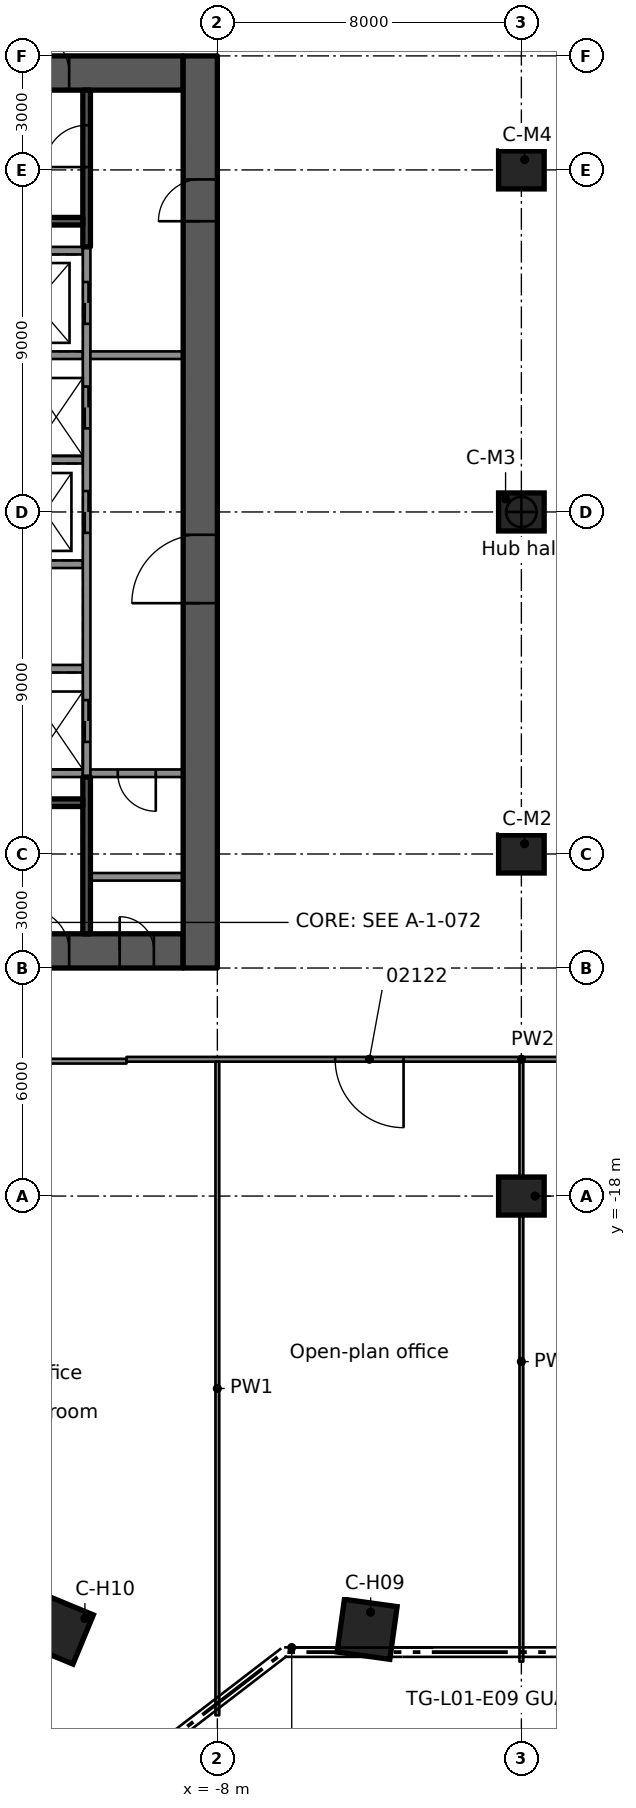
"""IFC4 building model, lengths in metres.
Left out: names, types, materials, properties, quantities, classifications, styles, units other than length and angle.
Written with IfcOpenShell. Run it as: python <this file> out.ifc"""

import sys

from ifc_helpers import new_model, si_unit, direction, frame, frame_2d, origin, origin_2d, place, context, subcontext, project, spatial, rectangle, extrude, element, fill, save


model = new_model("IFC4")
c1 = context("Model", 3, precision=1e-05, world=origin(), true_north=direction((0.0, 1.0)))
c2 = subcontext(c1, "Body", "Model", "MODEL_VIEW")
j1 = project(units=[si_unit("LENGTHUNIT", "METRE"), si_unit("PLANEANGLEUNIT", "RADIAN")], contexts=[c1])
p1 = place(None, origin())
s1 = spatial("IfcSite", under=j1, at=p1, CompositionType="ELEMENT")
p2 = place(p1, origin())
s2 = spatial("IfcBuilding", under=s1, at=p2, CompositionType="ELEMENT")
p3 = place(p2, frame((0.0, 0.0, 10.5)))
s3 = spatial("IfcBuildingStorey", under=s2, at=p3, CompositionType="ELEMENT", Elevation=10.5)
p4 = place(p3, frame((-18.1, 11.55, 0.0), z_axis=(0.0, 0.0, 1.0), x_axis=(1.0, 0.0, 0.0)))
e1 = element("IfcWall", 1, at=p4, inside=s3, PredefinedType="SHEAR", context=c2, shape_type="SweptSolid", body=[
    extrude(rectangle(XDim=9.2, YDim=0.9, at=frame_2d((4.6, 0.0))), origin(), (0.0, 0.0, 1.0), 5.0),
])
p5 = place(p4, frame((5.1, 0.0, 0.0)))
e2 = element("IfcOpeningElement", 2, at=p5, cuts=e1, PredefinedType="OPENING", context=c2, shape_type="SweptSolid", body=[
    extrude(rectangle(XDim=1.1, YDim=2.1, at=frame_2d((0.55, 1.05))), frame((0.0, 0.46, 0.0), z_axis=(0.0, -1.0, 0.0), x_axis=(1.0, 0.0, 0.0)), (0.0, 0.0, 1.0), 0.92),
])
p6 = place(p3, frame((-18.1, -11.55, 0.0), z_axis=(0.0, 0.0, 1.0), x_axis=(1.0, 0.0, 0.0)))
e3 = element("IfcWall", 3, at=p6, inside=s3, PredefinedType="SHEAR", context=c2, shape_type="SweptSolid", body=[
    extrude(rectangle(XDim=9.2, YDim=0.9, at=frame_2d((4.6, 0.0))), origin(), (0.0, 0.0, 1.0), 5.0),
])
p7 = place(p6, frame((5.1, 0.0, 0.0)))
e4 = element("IfcOpeningElement", 4, at=p7, cuts=e3, PredefinedType="OPENING", context=c2, shape_type="SweptSolid", body=[
    extrude(rectangle(XDim=1.1, YDim=2.1, at=frame_2d((0.55, 1.05))), frame((0.0, 0.46, 0.0), z_axis=(0.0, -1.0, 0.0), x_axis=(1.0, 0.0, 0.0)), (0.0, 0.0, 1.0), 0.92),
])
p8 = place(p6, frame((7.53, 0.0, 0.0)))
e5 = element("IfcOpeningElement", 5, at=p8, cuts=e3, PredefinedType="OPENING", context=c2, shape_type="SweptSolid", body=[
    extrude(rectangle(XDim=0.9, YDim=2.1, at=frame_2d((0.45, 1.05))), frame((0.0, 0.46, 0.0), z_axis=(0.0, -1.0, 0.0), x_axis=(1.0, 0.0, 0.0)), (0.0, 0.0, 1.0), 0.92),
])
p9 = place(p3, frame((-8.45, -12.0, 0.0), z_axis=(0.0, 0.0, 1.0), x_axis=(0.0, 1.0, 0.0)))
e6 = element("IfcWall", 6, at=p9, inside=s3, PredefinedType="SHEAR", context=c2, shape_type="SweptSolid", body=[
    extrude(rectangle(XDim=24.0, YDim=0.9, at=frame_2d((12.0, 0.0))), origin(), (0.0, 0.0, 1.0), 5.0),
])
p10 = place(p9, frame((9.6, 0.0, 0.0)))
e7 = element("IfcOpeningElement", 7, at=p10, cuts=e6, PredefinedType="OPENING", context=c2, shape_type="SweptSolid", body=[
    extrude(rectangle(XDim=1.8, YDim=2.1, at=frame_2d((0.9, 1.05))), frame((0.0, 0.46, 0.0), z_axis=(0.0, -1.0, 0.0), x_axis=(1.0, 0.0, 0.0)), (0.0, 0.0, 1.0), 0.92),
])
p11 = place(p9, frame((19.65, 0.0, 0.0)))
e8 = element("IfcOpeningElement", 8, at=p11, cuts=e6, PredefinedType="OPENING", context=c2, shape_type="SweptSolid", body=[
    extrude(rectangle(XDim=1.1, YDim=2.1, at=frame_2d((0.55, 1.05))), frame((0.0, 0.46, 0.0), z_axis=(0.0, -1.0, 0.0), x_axis=(1.0, 0.0, 0.0)), (0.0, 0.0, 1.0), 0.92),
])
for number, where, z_axis, x_axis in (
    (9, (-4.059, -29.4, -1.0), (0.0, 0.0, 1.0), (0.707, 0.707, 0.0)),
    (10, (-12.178, -29.4, -1.0), (0.0, 0.0, 1.0), (0.707, 0.707, 0.0)),
):
    element("IfcColumn", number, at=place(p3, frame(where, z_axis=z_axis, x_axis=x_axis)), inside=s3, PredefinedType="COLUMN", context=c2, shape_type="SweptSolid", body=[
        extrude(rectangle(XDim=3.4, YDim=3.4, at=origin_2d()), origin(), (0.0, 0.0, 1.0), 1.0),
    ])
for number, where, z_axis, x_axis in (
    (11, (-4.059, -29.4, 0.0), (0.0, 0.0, 1.0), (-0.137, -0.991, 0.0)),
    (12, (-12.178, -29.4, 0.0), (0.0, 0.0, 1.0), (-0.383, -0.924, 0.0)),
):
    element("IfcColumn", number, at=place(p3, frame(where, z_axis=z_axis, x_axis=x_axis)), inside=s3, PredefinedType="COLUMN", context=c2, shape_type="SweptSolid", body=[
        extrude(rectangle(XDim=1.4, YDim=1.4, at=origin_2d()), origin(), (0.0, 0.0, 1.0), 5.0),
    ])
for number, where, z_axis, x_axis in (
    (13, (0.0, -18.0, 0.0), (0.0, 0.0, 1.0), (1.0, 0.0, 0.0)),
    (14, (0.0, -9.0, 0.0), (0.0, 0.0, 1.0), (1.0, 0.0, 0.0)),
    (15, (0.0, 0.0, 0.0), (0.0, 0.0, 1.0), (1.0, 0.0, 0.0)),
    (16, (0.0, 9.0, 0.0), (0.0, 0.0, 1.0), (1.0, 0.0, 0.0)),
):
    element("IfcColumn", number, at=place(p3, frame(where, z_axis=z_axis, x_axis=x_axis)), inside=s3, PredefinedType="COLUMN", context=c2, shape_type="SweptSolid", body=[
        extrude(rectangle(XDim=1.2, YDim=1.0, at=origin_2d()), origin(), (0.0, 0.0, 1.0), 5.0),
    ])
for number, where, z_axis, x_axis in (
    (17, (-11.54, 6.875, 0.0), (0.0, 0.0, 1.0), (-1.0, 0.0, 0.0)),
    (18, (-11.54, -6.875, 0.0), (0.0, 0.0, 1.0), (-1.0, 0.0, 0.0)),
):
    element("IfcWall", number, at=place(p3, frame(where, z_axis=z_axis, x_axis=x_axis)), inside=s3, PredefinedType="SOLIDWALL", context=c2, shape_type="SweptSolid", body=[
        extrude(rectangle(XDim=6.56, YDim=0.2, at=frame_2d((3.28, 0.0))), origin(), (0.0, 0.0, 1.0), 4.59),
    ])
p12 = place(p3, frame((-11.54, -4.125, 0.0), z_axis=(0.0, 0.0, 1.0), x_axis=(-1.0, 0.0, 0.0)))
e19 = element("IfcWall", 19, at=p12, inside=s3, PredefinedType="SOLIDWALL", context=c2, shape_type="SweptSolid", body=[
    extrude(rectangle(XDim=4.7, YDim=0.2, at=frame_2d((2.35, 0.0))), origin(), (0.0, 0.0, 1.0), 4.59),
])
for number, where, z_axis, x_axis in (
    (20, (-11.54, -1.375, 0.0), (0.0, 0.0, 1.0), (-1.0, 0.0, 0.0)),
    (21, (-11.54, 1.375, 0.0), (0.0, 0.0, 1.0), (-1.0, 0.0, 0.0)),
):
    element("IfcWall", number, at=place(p3, frame(where, z_axis=z_axis, x_axis=x_axis)), inside=s3, PredefinedType="SOLIDWALL", context=c2, shape_type="SweptSolid", body=[
        extrude(rectangle(XDim=4.2, YDim=0.2, at=frame_2d((2.1, 0.0))), origin(), (0.0, 0.0, 1.0), 4.59),
    ])
p13 = place(p3, frame((-11.54, 4.125, 0.0), z_axis=(0.0, 0.0, 1.0), x_axis=(-1.0, 0.0, 0.0)))
e22 = element("IfcWall", 22, at=p13, inside=s3, PredefinedType="SOLIDWALL", context=c2, shape_type="SweptSolid", body=[
    extrude(rectangle(XDim=4.7, YDim=0.2, at=frame_2d((2.35, 0.0))), origin(), (0.0, 0.0, 1.0), 4.59),
])
p14 = place(p3, frame((-11.44, -6.975, 0.0), z_axis=(0.0, 0.0, 1.0), x_axis=(0.0, 1.0, 0.0)))
e23 = element("IfcWall", 23, at=p14, inside=s3, PredefinedType="SOLIDWALL", context=c2, shape_type="SweptSolid", body=[
    extrude(rectangle(XDim=13.95, YDim=0.2, at=frame_2d((6.975, 0.0))), origin(), (0.0, 0.0, 1.0), 4.59),
])
p15 = place(p14, frame((0.925, 0.0, 0.0)))
e24 = element("IfcOpeningElement", 24, at=p15, cuts=e23, PredefinedType="OPENING", context=c2, shape_type="SweptSolid", body=[
    extrude(rectangle(XDim=1.1, YDim=2.1, at=frame_2d((0.55, 1.05))), frame((0.0, 0.11, 0.0), z_axis=(0.0, -1.0, 0.0), x_axis=(1.0, 0.0, 0.0)), (0.0, 0.0, 1.0), 0.22),
])
p16 = place(p14, frame((6.425, 0.0, 0.0)))
e25 = element("IfcOpeningElement", 25, at=p16, cuts=e23, PredefinedType="OPENING", context=c2, shape_type="SweptSolid", body=[
    extrude(rectangle(XDim=1.1, YDim=2.1, at=frame_2d((0.55, 1.05))), frame((0.0, 0.11, 0.0), z_axis=(0.0, -1.0, 0.0), x_axis=(1.0, 0.0, 0.0)), (0.0, 0.0, 1.0), 0.22),
])
p17 = place(p14, frame((9.175, 0.0, 0.0)))
e26 = element("IfcOpeningElement", 26, at=p17, cuts=e23, PredefinedType="OPENING", context=c2, shape_type="SweptSolid", body=[
    extrude(rectangle(XDim=1.1, YDim=2.1, at=frame_2d((0.55, 1.05))), frame((0.0, 0.11, 0.0), z_axis=(0.0, -1.0, 0.0), x_axis=(1.0, 0.0, 0.0)), (0.0, 0.0, 1.0), 0.22),
])
p18 = place(p14, frame((11.925, 0.0, 0.0)))
e27 = element("IfcOpeningElement", 27, at=p18, cuts=e23, PredefinedType="OPENING", context=c2, shape_type="SweptSolid", body=[
    extrude(rectangle(XDim=1.1, YDim=2.1, at=frame_2d((0.55, 1.05))), frame((0.0, 0.11, 0.0), z_axis=(0.0, -1.0, 0.0), x_axis=(1.0, 0.0, 0.0)), (0.0, 0.0, 1.0), 0.22),
])
p19 = place(p3, frame((-11.44, 6.975, 0.0), z_axis=(0.0, 0.0, 1.0), x_axis=(0.0, 1.0, 0.0)))
e28 = element("IfcWall", 28, at=p19, inside=s3, PredefinedType="SOLIDWALL", context=c2, shape_type="SweptSolid", body=[
    extrude(rectangle(XDim=4.125, YDim=0.2, at=frame_2d((2.062, 0.0))), origin(), (0.0, 0.0, 1.0), 4.59),
])
p20 = place(p19, frame((2.1, 0.0, 0.0)))
e29 = element("IfcOpeningElement", 29, at=p20, cuts=e28, PredefinedType="OPENING", context=c2, shape_type="SweptSolid", body=[
    extrude(rectangle(XDim=1.1, YDim=2.1, at=frame_2d((0.55, 1.05))), frame((0.0, 0.11, 0.0), z_axis=(0.0, -1.0, 0.0), x_axis=(1.0, 0.0, 0.0)), (0.0, 0.0, 1.0), 0.22),
])
p21 = place(p3, frame((-11.54, 7.65, 0.0), z_axis=(0.0, 0.0, 1.0), x_axis=(-1.0, 0.0, 0.0)))
e30 = element("IfcWall", 30, at=p21, inside=s3, PredefinedType="SOLIDWALL", context=c2, shape_type="SweptSolid", body=[
    extrude(rectangle(XDim=6.56, YDim=0.2, at=frame_2d((3.28, 0.0))), origin(), (0.0, 0.0, 1.0), 4.59),
])
p22 = place(p3, frame((-11.44, -11.1, 0.0), z_axis=(0.0, 0.0, 1.0), x_axis=(0.0, 1.0, 0.0)))
e31 = element("IfcWall", 31, at=p22, inside=s3, PredefinedType="SOLIDWALL", context=c2, shape_type="SweptSolid", body=[
    extrude(rectangle(XDim=4.125, YDim=0.2, at=frame_2d((2.062, 0.0))), origin(), (0.0, 0.0, 1.0), 4.59),
])
p23 = place(p3, frame((-11.54, -7.65, 0.0), z_axis=(0.0, 0.0, 1.0), x_axis=(-1.0, 0.0, 0.0)))
e32 = element("IfcWall", 32, at=p23, inside=s3, PredefinedType="SOLIDWALL", context=c2, shape_type="SweptSolid", body=[
    extrude(rectangle(XDim=6.56, YDim=0.2, at=frame_2d((3.28, 0.0))), origin(), (0.0, 0.0, 1.0), 4.59),
])
p24 = place(p3, frame((-8.9, 4.125, 0.0), z_axis=(0.0, 0.0, 1.0), x_axis=(-1.0, 0.0, 0.0)))
e33 = element("IfcWall", 33, at=p24, inside=s3, PredefinedType="PARTITIONING", context=c2, shape_type="SweptSolid", body=[
    extrude(rectangle(XDim=2.44, YDim=0.2, at=frame_2d((1.22, 0.0))), origin(), (0.0, 0.0, 1.0), 4.59),
])
p25 = place(p3, frame((-8.9, -6.875, 0.0), z_axis=(0.0, 0.0, 1.0), x_axis=(-1.0, 0.0, 0.0)))
e34 = element("IfcWall", 34, at=p25, inside=s3, PredefinedType="PARTITIONING", context=c2, shape_type="SweptSolid", body=[
    extrude(rectangle(XDim=2.44, YDim=0.2, at=frame_2d((1.22, 0.0))), origin(), (0.0, 0.0, 1.0), 4.59),
])
p26 = place(p25, frame((0.72, 0.0, 0.0)))
e35 = element("IfcOpeningElement", 35, at=p26, cuts=e34, PredefinedType="OPENING", context=c2, shape_type="SweptSolid", body=[
    extrude(rectangle(XDim=1.0, YDim=2.1, at=frame_2d((0.5, 1.05))), frame((0.0, 0.11, 0.0), z_axis=(0.0, -1.0, 0.0), x_axis=(1.0, 0.0, 0.0)), (0.0, 0.0, 1.0), 0.22),
])
p27 = place(p3, frame((-8.9, -9.6, 0.0), z_axis=(0.0, 0.0, 1.0), x_axis=(-1.0, 0.0, 0.0)))
e36 = element("IfcWall", 36, at=p27, inside=s3, PredefinedType="PARTITIONING", context=c2, shape_type="SweptSolid", body=[
    extrude(rectangle(XDim=2.44, YDim=0.2, at=frame_2d((1.22, 0.0))), origin(), (0.0, 0.0, 1.0), 4.59),
])
p28 = place(p3, frame((-20.431, -23.791, 0.0), z_axis=(0.0, 0.0, 1.0), x_axis=(0.608708319694, -0.793394089678, 0.0)))
e37 = element("IfcWall", 37, at=p28, inside=s3, PredefinedType="PARTITIONING", context=c2, shape_type="SweptSolid", body=[
    extrude(rectangle(XDim=13.813, YDim=0.1, at=frame_2d((6.906, 0.0))), origin(), (0.0, 0.0, 1.0), 4.58),
])
p29 = place(p3, frame((-17.659, -14.451, 0.0), z_axis=(0.0, 0.0, 1.0), x_axis=(1.0, 0.0, 0.0)))
e38 = element("IfcWall", 38, at=p29, inside=s3, PredefinedType="PARTITIONING", context=c2, shape_type="SweptSolid", body=[
    extrude(rectangle(XDim=7.268, YDim=0.125, at=frame_2d((3.634, 0.0))), origin(), (0.0, 0.0, 1.0), 4.58),
])
p30 = place(p3, frame((10.391, -14.401, 0.0), z_axis=(0.0, 0.0, 1.0), x_axis=(-1.0, 0.0, 0.0)))
e39 = element("IfcWall", 39, at=p30, inside=s3, PredefinedType="PARTITIONING", context=c2, shape_type="SweptSolid", body=[
    extrude(rectangle(XDim=20.781, YDim=0.125, at=frame_2d((10.391, 0.0))), origin(), (0.0, 0.0, 1.0), 4.58),
])
p31 = place(p30, frame((13.491, 0.0, 0.0)))
e40 = element("IfcOpeningElement", 40, at=p31, cuts=e39, PredefinedType="OPENING", context=c2, shape_type="SweptSolid", body=[
    extrude(rectangle(XDim=1.8, YDim=2.1, at=frame_2d((0.9, 1.05))), frame((0.0, 0.073, 0.0), z_axis=(0.0, -1.0, 0.0), x_axis=(1.0, 0.0, 0.0)), (0.0, 0.0, 1.0), 0.145),
])
p32 = place(p30, frame((5.491, 0.0, 0.0)))
e41 = element("IfcOpeningElement", 41, at=p32, cuts=e39, PredefinedType="OPENING", context=c2, shape_type="SweptSolid", body=[
    extrude(rectangle(XDim=1.8, YDim=2.1, at=frame_2d((0.9, 1.05))), frame((0.0, 0.073, 0.0), z_axis=(0.0, -1.0, 0.0), x_axis=(1.0, 0.0, 0.0)), (0.0, 0.0, 1.0), 0.145),
])
p33 = place(p3, frame((0.0, -30.25, 0.0), z_axis=(0.0, 0.0, 1.0), x_axis=(0.0, 1.0, 0.0)))
e42 = element("IfcWall", 42, at=p33, inside=s3, PredefinedType="PARTITIONING", context=c2, shape_type="SweptSolid", body=[
    extrude(rectangle(XDim=15.787, YDim=0.1, at=frame_2d((7.894, 0.0))), origin(), (0.0, 0.0, 1.0), 4.58),
])
p34 = place(p3, frame((-8.0, -31.663, 0.0), z_axis=(0.0, 0.0, 1.0), x_axis=(0.0, 1.0, 0.0)))
e43 = element("IfcWall", 43, at=p34, inside=s3, PredefinedType="PARTITIONING", context=c2, shape_type="SweptSolid", body=[
    extrude(rectangle(XDim=17.2, YDim=0.1, at=frame_2d((8.6, 0.0))), origin(), (0.0, 0.0, 1.0), 4.58),
])
p35 = place(p15, origin())
e44 = element("IfcDoor", 44, at=p35, inside=s3, OperationType="DOUBLE_DOOR_SLIDING", PredefinedType="DOOR", context=c2, shape_type="SweptSolid", body=[
    extrude(rectangle(XDim=1.1, YDim=2.1, at=frame_2d((0.55, 1.05))), frame((0.0, 0.025, 0.0), z_axis=(0.0, -1.0, 0.0), x_axis=(1.0, 0.0, 0.0)), (0.0, 0.0, 1.0), 0.05),
])
fill(e24, e44)
p36 = place(p16, origin())
e45 = element("IfcDoor", 45, at=p36, inside=s3, OperationType="DOUBLE_DOOR_SLIDING", PredefinedType="DOOR", context=c2, shape_type="SweptSolid", body=[
    extrude(rectangle(XDim=1.1, YDim=2.1, at=frame_2d((0.55, 1.05))), frame((0.0, 0.025, 0.0), z_axis=(0.0, -1.0, 0.0), x_axis=(1.0, 0.0, 0.0)), (0.0, 0.0, 1.0), 0.05),
])
fill(e25, e45)
p37 = place(p17, origin())
e46 = element("IfcDoor", 46, at=p37, inside=s3, OperationType="DOUBLE_DOOR_SLIDING", PredefinedType="DOOR", context=c2, shape_type="SweptSolid", body=[
    extrude(rectangle(XDim=1.1, YDim=2.1, at=frame_2d((0.55, 1.05))), frame((0.0, 0.025, 0.0), z_axis=(0.0, -1.0, 0.0), x_axis=(1.0, 0.0, 0.0)), (0.0, 0.0, 1.0), 0.05),
])
fill(e26, e46)
p38 = place(p18, origin())
e47 = element("IfcDoor", 47, at=p38, inside=s3, OperationType="DOUBLE_DOOR_SLIDING", PredefinedType="DOOR", context=c2, shape_type="SweptSolid", body=[
    extrude(rectangle(XDim=1.1, YDim=2.1, at=frame_2d((0.55, 1.05))), frame((0.0, 0.025, 0.0), z_axis=(0.0, -1.0, 0.0), x_axis=(1.0, 0.0, 0.0)), (0.0, 0.0, 1.0), 0.05),
])
fill(e27, e47)
p39 = place(p10, origin())
e48 = element("IfcDoor", 48, at=p39, inside=s3, OperationType="SINGLE_SWING_LEFT", PredefinedType="DOOR", context=c2, shape_type="SweptSolid", body=[
    extrude(rectangle(XDim=1.8, YDim=2.1, at=frame_2d((0.9, 1.05))), frame((0.0, 0.025, 0.0), z_axis=(0.0, -1.0, 0.0), x_axis=(1.0, 0.0, 0.0)), (0.0, 0.0, 1.0), 0.05),
])
fill(e7, e48)
p40 = place(p11, origin())
e49 = element("IfcDoor", 49, at=p40, inside=s3, OperationType="SINGLE_SWING_RIGHT", PredefinedType="DOOR", context=c2, shape_type="SweptSolid", body=[
    extrude(rectangle(XDim=1.1, YDim=2.1, at=frame_2d((0.55, 1.05))), frame((0.0, 0.025, 0.0), z_axis=(0.0, -1.0, 0.0), x_axis=(1.0, 0.0, 0.0)), (0.0, 0.0, 1.0), 0.05),
])
fill(e8, e49)
p41 = place(p5, origin())
e50 = element("IfcDoor", 50, at=p41, inside=s3, OperationType="SINGLE_SWING_RIGHT", PredefinedType="DOOR", context=c2, shape_type="SweptSolid", body=[
    extrude(rectangle(XDim=1.1, YDim=2.1, at=frame_2d((0.55, 1.05))), frame((0.0, 0.025, 0.0), z_axis=(0.0, -1.0, 0.0), x_axis=(1.0, 0.0, 0.0)), (0.0, 0.0, 1.0), 0.05),
])
fill(e2, e50)
p42 = place(p7, origin())
e51 = element("IfcDoor", 51, at=p42, inside=s3, OperationType="SINGLE_SWING_RIGHT", PredefinedType="DOOR", context=c2, shape_type="SweptSolid", body=[
    extrude(rectangle(XDim=1.1, YDim=2.1, at=frame_2d((0.55, 1.05))), frame((0.0, 0.025, 0.0), z_axis=(0.0, -1.0, 0.0), x_axis=(1.0, 0.0, 0.0)), (0.0, 0.0, 1.0), 0.05),
])
fill(e4, e51)
p43 = place(p20, origin())
e52 = element("IfcDoor", 52, at=p43, inside=s3, OperationType="SINGLE_SWING_RIGHT", PredefinedType="DOOR", context=c2, shape_type="SweptSolid", body=[
    extrude(rectangle(XDim=1.1, YDim=2.1, at=frame_2d((0.55, 1.05))), frame((0.0, 0.025, 0.0), z_axis=(0.0, -1.0, 0.0), x_axis=(1.0, 0.0, 0.0)), (0.0, 0.0, 1.0), 0.05),
])
fill(e29, e52)
p44 = place(p8, origin())
e53 = element("IfcDoor", 53, at=p44, inside=s3, OperationType="SINGLE_SWING_RIGHT", PredefinedType="DOOR", context=c2, shape_type="SweptSolid", body=[
    extrude(rectangle(XDim=0.9, YDim=2.1, at=frame_2d((0.45, 1.05))), frame((0.0, 0.025, 0.0), z_axis=(0.0, -1.0, 0.0), x_axis=(1.0, 0.0, 0.0)), (0.0, 0.0, 1.0), 0.05),
])
fill(e5, e53)
p45 = place(p26, origin())
e54 = element("IfcDoor", 54, at=p45, inside=s3, OperationType="SINGLE_SWING_RIGHT", PredefinedType="DOOR", context=c2, shape_type="SweptSolid", body=[
    extrude(rectangle(XDim=1.0, YDim=2.1, at=frame_2d((0.5, 1.05))), frame((0.0, 0.025, 0.0), z_axis=(0.0, -1.0, 0.0), x_axis=(1.0, 0.0, 0.0)), (0.0, 0.0, 1.0), 0.05),
])
fill(e35, e54)
p46 = place(p31, origin())
e55 = element("IfcDoor", 55, at=p46, inside=s3, OperationType="DOUBLE_DOOR_SINGLE_SWING", PredefinedType="DOOR", context=c2, shape_type="SweptSolid", body=[
    extrude(rectangle(XDim=1.8, YDim=2.1, at=frame_2d((0.9, 1.05))), frame((0.0, 0.025, 0.0), z_axis=(0.0, -1.0, 0.0), x_axis=(1.0, 0.0, 0.0)), (0.0, 0.0, 1.0), 0.05),
])
fill(e40, e55)
save(model, sys.argv[1])
